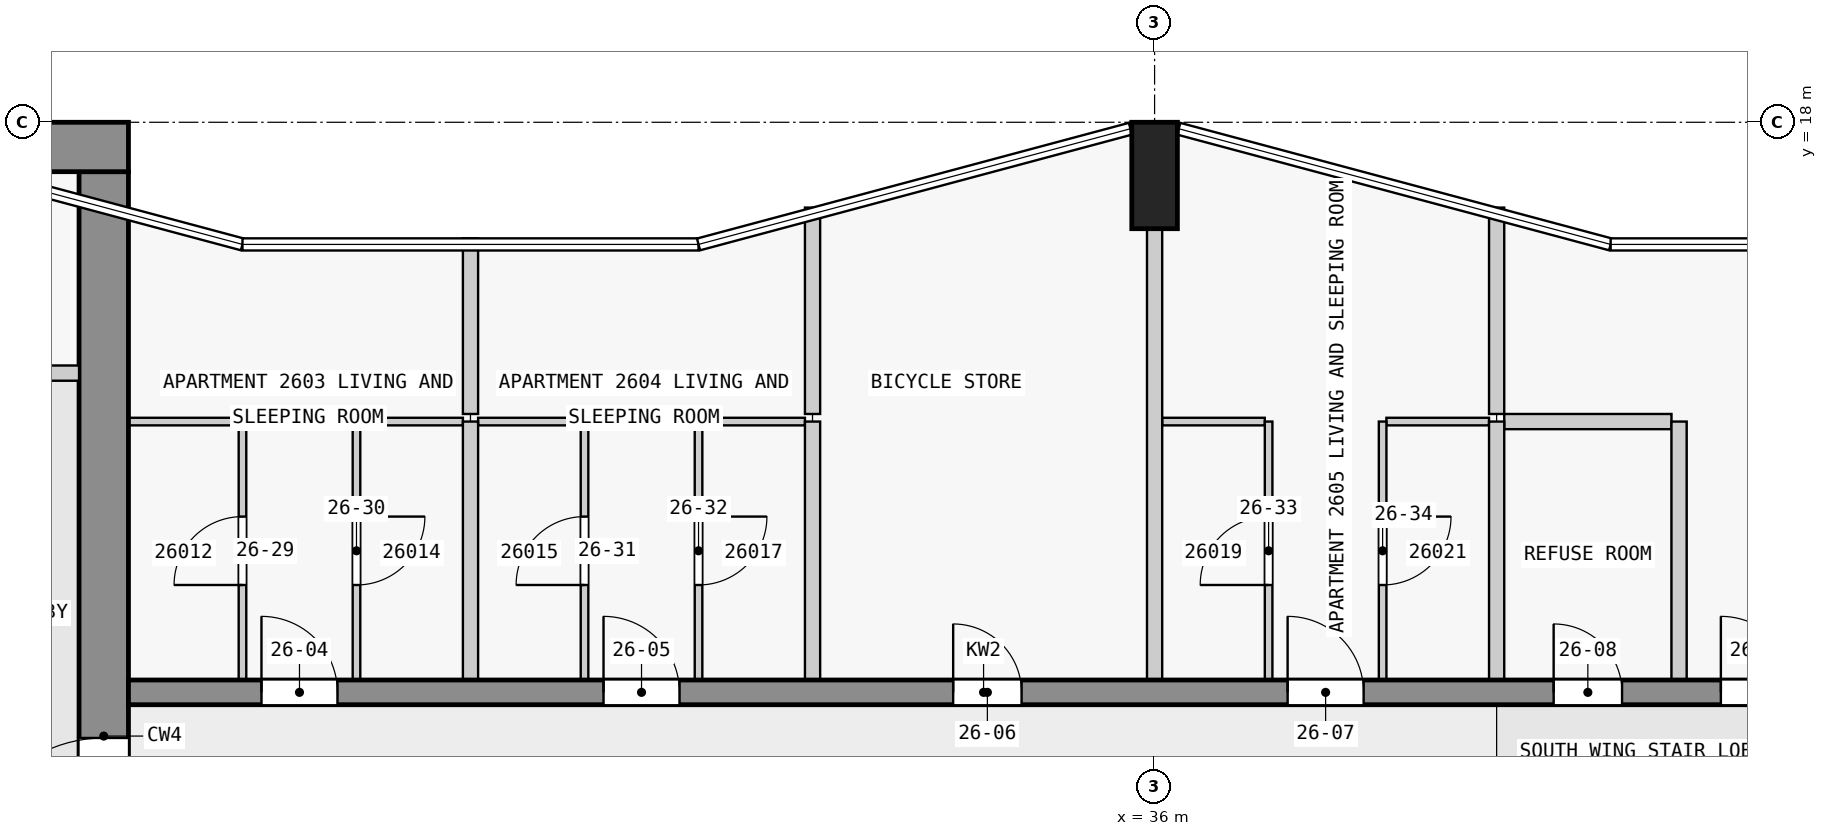
"""IFC4 building model, lengths in metres.
Left out: names, types, materials, properties, quantities, classifications, styles, units other than length and angle.
Written with IfcOpenShell. Run it as: python <this file> out.ifc"""

import sys

from ifc_helpers import new_model, si_unit, direction, frame, frame_2d, origin, origin_2d, place, context, subcontext, project, spatial, rectangle, extrude, element, fill, save


model = new_model("IFC4")
c1 = context("Model", 3, precision=1e-05, world=origin(), true_north=direction((0.0, 1.0)))
c2 = subcontext(c1, "Body", "Model", "MODEL_VIEW")
j1 = project(units=[si_unit("LENGTHUNIT", "METRE"), si_unit("PLANEANGLEUNIT", "RADIAN")], contexts=[c1])
p1 = place(None, origin())
s1 = spatial("IfcSite", under=j1, at=p1, CompositionType="ELEMENT")
p2 = place(p1, origin())
s2 = spatial("IfcBuilding", under=s1, at=p2, CompositionType="ELEMENT")
p3 = place(p2, frame((0.0, 0.0, 102.8)))
s3 = spatial("IfcBuildingStorey", under=s2, at=p3, CompositionType="ELEMENT", Elevation=102.8)
p4 = place(p3, frame((36.0, 17.3, 0.0), z_axis=(0.0, 0.0, 1.0), x_axis=(1.0, 0.0, 0.0)))
e1 = element("IfcColumn", 1, at=p4, inside=s3, PredefinedType="COLUMN", context=c2, shape_type="SweptSolid", body=[
    extrude(rectangle(XDim=0.6, YDim=1.4, at=origin_2d()), origin(), (0.0, 0.0, 1.0), 3.5),
])
p5 = place(p3, frame((1.65, 17.675, 0.0), z_axis=(0.0, 0.0, 1.0), x_axis=(1.0, 0.0, 0.0)))
e2 = element("IfcWall", 2, at=p5, inside=s3, PredefinedType="SHEAR", context=c2, shape_type="SweptSolid", body=[
    extrude(rectangle(XDim=20.85, YDim=0.65, at=frame_2d((10.425, 0.0))), origin(), (0.0, 0.0, 1.0), 3.25),
])
p6 = place(p5, frame((6.45, 0.0, 0.0)))
e3 = element("IfcOpeningElement", 3, at=p6, cuts=e2, PredefinedType="OPENING", context=c2, shape_type="SweptSolid", body=[
    extrude(rectangle(XDim=1.8, YDim=2.1, at=frame_2d((0.9, 1.05))), frame((0.0, 0.335, 0.0), z_axis=(0.0, -1.0, 0.0), x_axis=(1.0, 0.0, 0.0)), (0.0, 0.0, 1.0), 0.67),
])
p7 = place(p3, frame((22.175, 2.5, 0.0), z_axis=(0.0, 0.0, 1.0), x_axis=(0.0, 1.0, 0.0)))
e4 = element("IfcWall", 4, at=p7, inside=s3, PredefinedType="SHEAR", context=c2, shape_type="SweptSolid", body=[
    extrude(rectangle(XDim=14.85, YDim=0.65, at=frame_2d((7.425, 0.0))), origin(), (0.0, 0.0, 1.0), 3.25),
])
p8 = place(p7, frame((5.6, 0.0, 0.0)))
e5 = element("IfcOpeningElement", 5, at=p8, cuts=e4, PredefinedType="OPENING", context=c2, shape_type="SweptSolid", body=[
    extrude(rectangle(XDim=1.8, YDim=2.1, at=frame_2d((0.9, 1.05))), frame((0.0, 0.335, 0.0), z_axis=(0.0, -1.0, 0.0), x_axis=(1.0, 0.0, 0.0)), (0.0, 0.0, 1.0), 0.67),
])
p9 = place(p3, frame((22.5, 10.5, 0.0), z_axis=(0.0, 0.0, 1.0), x_axis=(1.0, 0.0, 0.0)))
e6 = element("IfcWall", 6, at=p9, inside=s3, PredefinedType="SHEAR", context=c2, shape_type="SweptSolid", body=[
    extrude(rectangle(XDim=22.5, YDim=0.325, at=frame_2d((11.25, 0.0))), origin(), (0.0, 0.0, 1.0), 3.25),
])
p10 = place(p9, frame((1.75, 0.0, 0.0)))
e7 = element("IfcOpeningElement", 7, at=p10, cuts=e6, PredefinedType="OPENING", context=c2, shape_type="SweptSolid", body=[
    extrude(rectangle(XDim=1.0, YDim=2.1, at=frame_2d((0.5, 1.05))), frame((0.0, 0.172, 0.0), z_axis=(0.0, -1.0, 0.0), x_axis=(1.0, 0.0, 0.0)), (0.0, 0.0, 1.0), 0.345),
])
p11 = place(p9, frame((6.25, 0.0, 0.0)))
e8 = element("IfcOpeningElement", 8, at=p11, cuts=e6, PredefinedType="OPENING", context=c2, shape_type="SweptSolid", body=[
    extrude(rectangle(XDim=1.0, YDim=2.1, at=frame_2d((0.5, 1.05))), frame((0.0, 0.172, 0.0), z_axis=(0.0, -1.0, 0.0), x_axis=(1.0, 0.0, 0.0)), (0.0, 0.0, 1.0), 0.345),
])
p12 = place(p9, frame((10.85, 0.0, 0.0)))
e9 = element("IfcOpeningElement", 9, at=p12, cuts=e6, PredefinedType="OPENING", context=c2, shape_type="SweptSolid", body=[
    extrude(rectangle(XDim=0.9, YDim=2.1, at=frame_2d((0.45, 1.05))), frame((0.0, 0.172, 0.0), z_axis=(0.0, -1.0, 0.0), x_axis=(1.0, 0.0, 0.0)), (0.0, 0.0, 1.0), 0.345),
])
p13 = place(p9, frame((15.25, 0.0, 0.0)))
e10 = element("IfcOpeningElement", 10, at=p13, cuts=e6, PredefinedType="OPENING", context=c2, shape_type="SweptSolid", body=[
    extrude(rectangle(XDim=1.0, YDim=2.1, at=frame_2d((0.5, 1.05))), frame((0.0, 0.172, 0.0), z_axis=(0.0, -1.0, 0.0), x_axis=(1.0, 0.0, 0.0)), (0.0, 0.0, 1.0), 0.345),
])
p14 = place(p9, frame((18.75, 0.0, 0.0)))
e11 = element("IfcOpeningElement", 11, at=p14, cuts=e6, PredefinedType="OPENING", context=c2, shape_type="SweptSolid", body=[
    extrude(rectangle(XDim=0.9, YDim=2.1, at=frame_2d((0.45, 1.05))), frame((0.0, 0.172, 0.0), z_axis=(0.0, -1.0, 0.0), x_axis=(1.0, 0.0, 0.0)), (0.0, 0.0, 1.0), 0.345),
])
p15 = place(p9, frame((20.95, 0.0, 0.0)))
e12 = element("IfcOpeningElement", 12, at=p15, cuts=e6, PredefinedType="OPENING", context=c2, shape_type="SweptSolid", body=[
    extrude(rectangle(XDim=1.0, YDim=2.1, at=frame_2d((0.5, 1.05))), frame((0.0, 0.172, 0.0), z_axis=(0.0, -1.0, 0.0), x_axis=(1.0, 0.0, 0.0)), (0.0, 0.0, 1.0), 0.345),
])
p16 = place(p3, frame((18.6, 14.7, 0.0), z_axis=(0.0, 0.0, 1.0), x_axis=(1.0, 0.0, 0.0)))
e13 = element("IfcWall", 13, at=p16, inside=s3, PredefinedType="PARTITIONING", context=c2, shape_type="SweptSolid", body=[
    extrude(rectangle(XDim=3.25, YDim=0.2, at=frame_2d((1.625, 0.0))), origin(), (0.0, 0.0, 1.0), 3.25),
])
p17 = place(p16, frame((0.3, 0.0, 0.0)))
e14 = element("IfcOpeningElement", 14, at=p17, cuts=e13, PredefinedType="OPENING", context=c2, shape_type="SweptSolid", body=[
    extrude(rectangle(XDim=0.9, YDim=2.1, at=frame_2d((0.45, 1.05))), frame((0.0, 0.11, 0.0), z_axis=(0.0, -1.0, 0.0), x_axis=(1.0, 0.0, 0.0)), (0.0, 0.0, 1.0), 0.22),
])
p18 = place(p16, frame((1.925, 0.0, 0.0)))
e15 = element("IfcOpeningElement", 15, at=p18, cuts=e13, PredefinedType="OPENING", context=c2, shape_type="SweptSolid", body=[
    extrude(rectangle(XDim=0.9, YDim=2.1, at=frame_2d((0.45, 1.05))), frame((0.0, 0.11, 0.0), z_axis=(0.0, -1.0, 0.0), x_axis=(1.0, 0.0, 0.0)), (0.0, 0.0, 1.0), 0.22),
])
p19 = place(p3, frame((23.95, 14.062, 0.0), z_axis=(0.0, 0.0, 1.0), x_axis=(-1.0, 0.0, 0.0)))
e16 = element("IfcWall", 16, at=p19, inside=s3, PredefinedType="PARTITIONING", context=c2, shape_type="SweptSolid", body=[
    extrude(rectangle(XDim=1.45, YDim=0.1, at=frame_2d((0.725, 0.0))), origin(), (0.0, 0.0, 1.0), 3.25),
])
for number, where, z_axis, x_axis in (
    (17, (26.9, 14.062, 0.0), (0.0, 0.0, 1.0), (-1.0, 0.0, 0.0)),
    (18, (28.45, 14.062, 0.0), (0.0, 0.0, 1.0), (-1.0, 0.0, 0.0)),
    (19, (31.4, 14.062, 0.0), (0.0, 0.0, 1.0), (-1.0, 0.0, 0.0)),
    (20, (37.45, 14.062, 0.0), (0.0, 0.0, 1.0), (-1.0, 0.0, 0.0)),
    (21, (40.4, 14.062, 0.0), (0.0, 0.0, 1.0), (-1.0, 0.0, 0.0)),
):
    element("IfcWall", number, at=place(p3, frame(where, z_axis=z_axis, x_axis=x_axis)), inside=s3, PredefinedType="PARTITIONING", context=c2, shape_type="SweptSolid", body=[
        extrude(rectangle(XDim=1.35, YDim=0.1, at=frame_2d((0.675, 0.0))), origin(), (0.0, 0.0, 1.0), 3.25),
    ])
p20 = place(p3, frame((42.8, 14.062, 0.0), z_axis=(0.0, 0.0, 1.0), x_axis=(-1.0, 0.0, 0.0)))
e22 = element("IfcWall", 22, at=p20, inside=s3, PredefinedType="PARTITIONING", context=c2, shape_type="SweptSolid", body=[
    extrude(rectangle(XDim=2.2, YDim=0.2, at=frame_2d((1.1, 0.0))), origin(), (0.0, 0.0, 1.0), 3.25),
])
p21 = place(p3, frame((24.0, 10.663, 0.0), z_axis=(0.0, 0.0, 1.0), x_axis=(0.0, 1.0, 0.0)))
e23 = element("IfcWall", 23, at=p21, inside=s3, PredefinedType="PARTITIONING", context=c2, shape_type="SweptSolid", body=[
    extrude(rectangle(XDim=3.4, YDim=0.1, at=frame_2d((1.7, 0.0))), origin(), (0.0, 0.0, 1.0), 3.25),
])
p22 = place(p21, frame((1.25, 0.0, 0.0)))
e24 = element("IfcOpeningElement", 24, at=p22, cuts=e23, PredefinedType="OPENING", context=c2, shape_type="SweptSolid", body=[
    extrude(rectangle(XDim=0.9, YDim=2.1, at=frame_2d((0.45, 1.05))), frame((0.0, 0.06, 0.0), z_axis=(0.0, -1.0, 0.0), x_axis=(1.0, 0.0, 0.0)), (0.0, 0.0, 1.0), 0.12),
])
p23 = place(p3, frame((25.5, 14.062, 0.0), z_axis=(0.0, 0.0, 1.0), x_axis=(0.0, -1.0, 0.0)))
e25 = element("IfcWall", 25, at=p23, inside=s3, PredefinedType="PARTITIONING", context=c2, shape_type="SweptSolid", body=[
    extrude(rectangle(XDim=3.4, YDim=0.1, at=frame_2d((1.7, 0.0))), origin(), (0.0, 0.0, 1.0), 3.25),
])
p24 = place(p23, frame((1.25, 0.0, 0.0)))
e26 = element("IfcOpeningElement", 26, at=p24, cuts=e25, PredefinedType="OPENING", context=c2, shape_type="SweptSolid", body=[
    extrude(rectangle(XDim=0.9, YDim=2.1, at=frame_2d((0.45, 1.05))), frame((0.0, 0.06, 0.0), z_axis=(0.0, -1.0, 0.0), x_axis=(1.0, 0.0, 0.0)), (0.0, 0.0, 1.0), 0.12),
])
p25 = place(p3, frame((27.0, 16.473, 0.0), z_axis=(0.0, 0.0, 1.0), x_axis=(0.0, -1.0, 0.0)))
e27 = element("IfcWall", 27, at=p25, inside=s3, PredefinedType="PARTITIONING", context=c2, shape_type="SweptSolid", body=[
    extrude(rectangle(XDim=2.311, YDim=0.2, at=frame_2d((1.155, 0.0))), origin(), (0.0, 0.0, 1.0), 3.25),
])
p26 = place(p3, frame((27.0, 10.663, 0.0), z_axis=(0.0, 0.0, 1.0), x_axis=(0.0, 1.0, 0.0)))
e28 = element("IfcWall", 28, at=p26, inside=s3, PredefinedType="PARTITIONING", context=c2, shape_type="SweptSolid", body=[
    extrude(rectangle(XDim=3.4, YDim=0.2, at=frame_2d((1.7, 0.0))), origin(), (0.0, 0.0, 1.0), 3.25),
])
p27 = place(p3, frame((28.5, 10.663, 0.0), z_axis=(0.0, 0.0, 1.0), x_axis=(0.0, 1.0, 0.0)))
e29 = element("IfcWall", 29, at=p27, inside=s3, PredefinedType="PARTITIONING", context=c2, shape_type="SweptSolid", body=[
    extrude(rectangle(XDim=3.4, YDim=0.1, at=frame_2d((1.7, 0.0))), origin(), (0.0, 0.0, 1.0), 3.25),
])
p28 = place(p27, frame((1.25, 0.0, 0.0)))
e30 = element("IfcOpeningElement", 30, at=p28, cuts=e29, PredefinedType="OPENING", context=c2, shape_type="SweptSolid", body=[
    extrude(rectangle(XDim=0.9, YDim=2.1, at=frame_2d((0.45, 1.05))), frame((0.0, 0.06, 0.0), z_axis=(0.0, -1.0, 0.0), x_axis=(1.0, 0.0, 0.0)), (0.0, 0.0, 1.0), 0.12),
])
p29 = place(p3, frame((30.0, 14.062, 0.0), z_axis=(0.0, 0.0, 1.0), x_axis=(0.0, -1.0, 0.0)))
e31 = element("IfcWall", 31, at=p29, inside=s3, PredefinedType="PARTITIONING", context=c2, shape_type="SweptSolid", body=[
    extrude(rectangle(XDim=3.4, YDim=0.1, at=frame_2d((1.7, 0.0))), origin(), (0.0, 0.0, 1.0), 3.25),
])
p30 = place(p29, frame((1.25, 0.0, 0.0)))
e32 = element("IfcOpeningElement", 32, at=p30, cuts=e31, PredefinedType="OPENING", context=c2, shape_type="SweptSolid", body=[
    extrude(rectangle(XDim=0.9, YDim=2.1, at=frame_2d((0.45, 1.05))), frame((0.0, 0.06, 0.0), z_axis=(0.0, -1.0, 0.0), x_axis=(1.0, 0.0, 0.0)), (0.0, 0.0, 1.0), 0.12),
])
p31 = place(p3, frame((31.5, 16.878, 0.0), z_axis=(0.0, 0.0, 1.0), x_axis=(0.0, -1.0, 0.0)))
e33 = element("IfcWall", 33, at=p31, inside=s3, PredefinedType="PARTITIONING", context=c2, shape_type="SweptSolid", body=[
    extrude(rectangle(XDim=2.715, YDim=0.2, at=frame_2d((1.357, 0.0))), origin(), (0.0, 0.0, 1.0), 3.25),
])
p32 = place(p3, frame((31.5, 10.663, 0.0), z_axis=(0.0, 0.0, 1.0), x_axis=(0.0, 1.0, 0.0)))
e34 = element("IfcWall", 34, at=p32, inside=s3, PredefinedType="PARTITIONING", context=c2, shape_type="SweptSolid", body=[
    extrude(rectangle(XDim=3.4, YDim=0.2, at=frame_2d((1.7, 0.0))), origin(), (0.0, 0.0, 1.0), 3.25),
])
p33 = place(p3, frame((36.0, 10.663, 0.0), z_axis=(0.0, 0.0, 1.0), x_axis=(0.0, 1.0, 0.0)))
e35 = element("IfcWall", 35, at=p33, inside=s3, PredefinedType="PARTITIONING", context=c2, shape_type="SweptSolid", body=[
    extrude(rectangle(XDim=5.938, YDim=0.2, at=frame_2d((2.969, 0.0))), origin(), (0.0, 0.0, 1.0), 3.25),
])
p34 = place(p3, frame((37.5, 10.663, 0.0), z_axis=(0.0, 0.0, 1.0), x_axis=(0.0, 1.0, 0.0)))
e36 = element("IfcWall", 36, at=p34, inside=s3, PredefinedType="PARTITIONING", context=c2, shape_type="SweptSolid", body=[
    extrude(rectangle(XDim=3.4, YDim=0.1, at=frame_2d((1.7, 0.0))), origin(), (0.0, 0.0, 1.0), 3.25),
])
p35 = place(p34, frame((1.25, 0.0, 0.0)))
e37 = element("IfcOpeningElement", 37, at=p35, cuts=e36, PredefinedType="OPENING", context=c2, shape_type="SweptSolid", body=[
    extrude(rectangle(XDim=0.9, YDim=2.1, at=frame_2d((0.45, 1.05))), frame((0.0, 0.06, 0.0), z_axis=(0.0, -1.0, 0.0), x_axis=(1.0, 0.0, 0.0)), (0.0, 0.0, 1.0), 0.12),
])
p36 = place(p3, frame((39.0, 14.062, 0.0), z_axis=(0.0, 0.0, 1.0), x_axis=(0.0, -1.0, 0.0)))
e38 = element("IfcWall", 38, at=p36, inside=s3, PredefinedType="PARTITIONING", context=c2, shape_type="SweptSolid", body=[
    extrude(rectangle(XDim=3.4, YDim=0.1, at=frame_2d((1.7, 0.0))), origin(), (0.0, 0.0, 1.0), 3.25),
])
p37 = place(p36, frame((1.25, 0.0, 0.0)))
e39 = element("IfcOpeningElement", 39, at=p37, cuts=e38, PredefinedType="OPENING", context=c2, shape_type="SweptSolid", body=[
    extrude(rectangle(XDim=0.9, YDim=2.1, at=frame_2d((0.45, 1.05))), frame((0.0, 0.06, 0.0), z_axis=(0.0, -1.0, 0.0), x_axis=(1.0, 0.0, 0.0)), (0.0, 0.0, 1.0), 0.12),
])
p38 = place(p3, frame((40.5, 16.878, 0.0), z_axis=(0.0, 0.0, 1.0), x_axis=(0.0, -1.0, 0.0)))
e40 = element("IfcWall", 40, at=p38, inside=s3, PredefinedType="PARTITIONING", context=c2, shape_type="SweptSolid", body=[
    extrude(rectangle(XDim=2.715, YDim=0.2, at=frame_2d((1.357, 0.0))), origin(), (0.0, 0.0, 1.0), 3.25),
])
for number, where, z_axis, x_axis in (
    (41, (40.5, 10.663, 0.0), (0.0, 0.0, 1.0), (0.0, 1.0, 0.0)),
    (42, (42.9, 10.663, 0.0), (0.0, 0.0, 1.0), (0.0, 1.0, 0.0)),
):
    element("IfcWall", number, at=place(p3, frame(where, z_axis=z_axis, x_axis=x_axis)), inside=s3, PredefinedType="PARTITIONING", context=c2, shape_type="SweptSolid", body=[
        extrude(rectangle(XDim=3.4, YDim=0.2, at=frame_2d((1.7, 0.0))), origin(), (0.0, 0.0, 1.0), 3.25),
    ])
p39 = place(p8, origin())
e43 = element("IfcDoor", 43, at=p39, inside=s3, OperationType="DOUBLE_DOOR_SINGLE_SWING", PredefinedType="DOOR", context=c2, shape_type="SweptSolid", body=[
    extrude(rectangle(XDim=1.8, YDim=2.1, at=frame_2d((0.9, 1.05))), frame((0.0, 0.025, 0.0), z_axis=(0.0, -1.0, 0.0), x_axis=(1.0, 0.0, 0.0)), (0.0, 0.0, 1.0), 0.05),
])
fill(e5, e43)
p40 = place(p10, origin())
e44 = element("IfcDoor", 44, at=p40, inside=s3, OperationType="SINGLE_SWING_LEFT", PredefinedType="DOOR", context=c2, shape_type="SweptSolid", body=[
    extrude(rectangle(XDim=1.0, YDim=2.1, at=frame_2d((0.5, 1.05))), frame((0.0, 0.025, 0.0), z_axis=(0.0, -1.0, 0.0), x_axis=(1.0, 0.0, 0.0)), (0.0, 0.0, 1.0), 0.05),
])
fill(e7, e44)
p41 = place(p11, origin())
e45 = element("IfcDoor", 45, at=p41, inside=s3, OperationType="SINGLE_SWING_LEFT", PredefinedType="DOOR", context=c2, shape_type="SweptSolid", body=[
    extrude(rectangle(XDim=1.0, YDim=2.1, at=frame_2d((0.5, 1.05))), frame((0.0, 0.025, 0.0), z_axis=(0.0, -1.0, 0.0), x_axis=(1.0, 0.0, 0.0)), (0.0, 0.0, 1.0), 0.05),
])
fill(e8, e45)
p42 = place(p12, origin())
e46 = element("IfcDoor", 46, at=p42, inside=s3, OperationType="SINGLE_SWING_RIGHT", PredefinedType="DOOR", context=c2, shape_type="SweptSolid", body=[
    extrude(rectangle(XDim=0.9, YDim=2.1, at=frame_2d((0.45, 1.05))), frame((0.0, 0.025, 0.0), z_axis=(0.0, -1.0, 0.0), x_axis=(1.0, 0.0, 0.0)), (0.0, 0.0, 1.0), 0.05),
])
fill(e9, e46)
p43 = place(p13, origin())
e47 = element("IfcDoor", 47, at=p43, inside=s3, OperationType="SINGLE_SWING_RIGHT", PredefinedType="DOOR", context=c2, shape_type="SweptSolid", body=[
    extrude(rectangle(XDim=1.0, YDim=2.1, at=frame_2d((0.5, 1.05))), frame((0.0, 0.025, 0.0), z_axis=(0.0, -1.0, 0.0), x_axis=(1.0, 0.0, 0.0)), (0.0, 0.0, 1.0), 0.05),
])
fill(e10, e47)
p44 = place(p14, origin())
e48 = element("IfcDoor", 48, at=p44, inside=s3, OperationType="SINGLE_SWING_RIGHT", PredefinedType="DOOR", context=c2, shape_type="SweptSolid", body=[
    extrude(rectangle(XDim=0.9, YDim=2.1, at=frame_2d((0.45, 1.05))), frame((0.0, 0.025, 0.0), z_axis=(0.0, -1.0, 0.0), x_axis=(1.0, 0.0, 0.0)), (0.0, 0.0, 1.0), 0.05),
])
fill(e11, e48)
p45 = place(p15, origin())
e49 = element("IfcDoor", 49, at=p45, inside=s3, OperationType="SINGLE_SWING_RIGHT", PredefinedType="DOOR", context=c2, shape_type="SweptSolid", body=[
    extrude(rectangle(XDim=1.0, YDim=2.1, at=frame_2d((0.5, 1.05))), frame((0.0, 0.025, 0.0), z_axis=(0.0, -1.0, 0.0), x_axis=(1.0, 0.0, 0.0)), (0.0, 0.0, 1.0), 0.05),
])
fill(e12, e49)
p46 = place(p22, origin())
e50 = element("IfcDoor", 50, at=p46, inside=s3, OperationType="SINGLE_SWING_LEFT", PredefinedType="DOOR", context=c2, shape_type="SweptSolid", body=[
    extrude(rectangle(XDim=0.9, YDim=2.1, at=frame_2d((0.45, 1.05))), frame((0.0, 0.025, 0.0), z_axis=(0.0, -1.0, 0.0), x_axis=(1.0, 0.0, 0.0)), (0.0, 0.0, 1.0), 0.05),
])
fill(e24, e50)
p47 = place(p24, origin())
e51 = element("IfcDoor", 51, at=p47, inside=s3, OperationType="SINGLE_SWING_LEFT", PredefinedType="DOOR", context=c2, shape_type="SweptSolid", body=[
    extrude(rectangle(XDim=0.9, YDim=2.1, at=frame_2d((0.45, 1.05))), frame((0.0, 0.025, 0.0), z_axis=(0.0, -1.0, 0.0), x_axis=(1.0, 0.0, 0.0)), (0.0, 0.0, 1.0), 0.05),
])
fill(e26, e51)
p48 = place(p28, origin())
e52 = element("IfcDoor", 52, at=p48, inside=s3, OperationType="SINGLE_SWING_LEFT", PredefinedType="DOOR", context=c2, shape_type="SweptSolid", body=[
    extrude(rectangle(XDim=0.9, YDim=2.1, at=frame_2d((0.45, 1.05))), frame((0.0, 0.025, 0.0), z_axis=(0.0, -1.0, 0.0), x_axis=(1.0, 0.0, 0.0)), (0.0, 0.0, 1.0), 0.05),
])
fill(e30, e52)
p49 = place(p30, origin())
e53 = element("IfcDoor", 53, at=p49, inside=s3, OperationType="SINGLE_SWING_LEFT", PredefinedType="DOOR", context=c2, shape_type="SweptSolid", body=[
    extrude(rectangle(XDim=0.9, YDim=2.1, at=frame_2d((0.45, 1.05))), frame((0.0, 0.025, 0.0), z_axis=(0.0, -1.0, 0.0), x_axis=(1.0, 0.0, 0.0)), (0.0, 0.0, 1.0), 0.05),
])
fill(e32, e53)
p50 = place(p35, origin())
e54 = element("IfcDoor", 54, at=p50, inside=s3, OperationType="SINGLE_SWING_LEFT", PredefinedType="DOOR", context=c2, shape_type="SweptSolid", body=[
    extrude(rectangle(XDim=0.9, YDim=2.1, at=frame_2d((0.45, 1.05))), frame((0.0, 0.025, 0.0), z_axis=(0.0, -1.0, 0.0), x_axis=(1.0, 0.0, 0.0)), (0.0, 0.0, 1.0), 0.05),
])
fill(e37, e54)
p51 = place(p37, origin())
e55 = element("IfcDoor", 55, at=p51, inside=s3, OperationType="SINGLE_SWING_LEFT", PredefinedType="DOOR", context=c2, shape_type="SweptSolid", body=[
    extrude(rectangle(XDim=0.9, YDim=2.1, at=frame_2d((0.45, 1.05))), frame((0.0, 0.025, 0.0), z_axis=(0.0, -1.0, 0.0), x_axis=(1.0, 0.0, 0.0)), (0.0, 0.0, 1.0), 0.05),
])
fill(e39, e55)
save(model, sys.argv[1])
